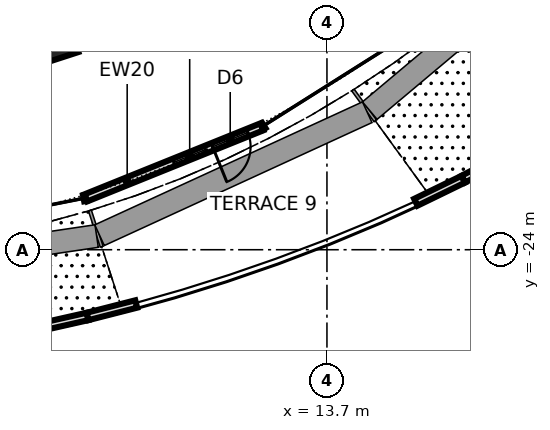
"""IFC4 building model, lengths in metres.
Left out: names, types, materials, properties, quantities, classifications, styles, units other than length and angle.
Written with IfcOpenShell. Run it as: python <this file> out.ifc"""

import sys

from ifc_helpers import new_model, si_unit, direction, frame, frame_2d, origin, origin_2d, place, context, subcontext, project, spatial, rectangle, extrude, element, fill, save


model = new_model("IFC4")
c1 = context("Model", 3, precision=1e-05, world=origin(), true_north=direction((0.0, 1.0)))
c2 = subcontext(c1, "Body", "Model", "MODEL_VIEW")
j1 = project(units=[si_unit("LENGTHUNIT", "METRE"), si_unit("PLANEANGLEUNIT", "RADIAN")], contexts=[c1])
p1 = place(None, origin())
s1 = spatial("IfcSite", under=j1, at=p1, CompositionType="ELEMENT")
p2 = place(p1, origin())
s2 = spatial("IfcBuilding", under=s1, at=p2, CompositionType="ELEMENT")
p3 = place(p2, frame((0.0, 0.0, 19.6)))
s3 = spatial("IfcBuildingStorey", under=s2, at=p3, CompositionType="ELEMENT", Elevation=19.6)
p4 = place(p3, frame((5.9, -18.157, 0.0), z_axis=(0.0, 0.0, 1.0), x_axis=(0.309016994375, -0.951056516295, 0.0)))
e1 = element("IfcColumn", 1, at=p4, inside=s3, PredefinedType="COLUMN", context=c2, shape_type="SweptSolid", body=[
    extrude(rectangle(XDim=2.0, YDim=2.0, at=origin_2d()), origin(), (0.0, 0.0, 1.0), 4.2),
])
p5 = place(p3, frame((7.355, -22.636, 0.0), z_axis=(0.0, 0.0, 1.0), x_axis=(0.92734032011, 0.374219094513, 0.0)))
e2 = element("IfcWall", 2, at=p5, inside=s3, PredefinedType="SOLIDWALL", context=c2, shape_type="SweptSolid", body=[
    extrude(rectangle(XDim=4.997, YDim=0.2, at=frame_2d((2.499, 0.0))), origin(), (0.0, 0.0, 1.0), 4.04),
])
p6 = place(p5, frame((3.597, 0.0, 0.0)))
e3 = element("IfcOpeningElement", 3, at=p6, cuts=e2, PredefinedType="OPENING", context=c2, shape_type="SweptSolid", body=[
    extrude(rectangle(XDim=1.0, YDim=2.4, at=frame_2d((0.5, 1.2))), frame((0.0, 0.11, 0.0), z_axis=(0.0, -1.0, 0.0), x_axis=(1.0, 0.0, 0.0)), (0.0, 0.0, 1.0), 0.22),
])
p7 = place(p5, frame((2.498, 0.0, 0.3)))
e4 = element("IfcOpeningElement", 4, at=p7, cuts=e2, PredefinedType="OPENING", context=c2, shape_type="SweptSolid", body=[
    extrude(rectangle(XDim=0.9, YDim=2.1, at=frame_2d((0.45, 1.05))), frame((0.0, 0.11, 0.0), z_axis=(0.0, -1.0, 0.0), x_axis=(1.0, 0.0, 0.0)), (0.0, 0.0, 1.0), 0.22),
])
p8 = place(p5, frame((3.597, 0.0, 2.7)))
e5 = element("IfcOpeningElement", 5, at=p8, cuts=e2, PredefinedType="OPENING", context=c2, shape_type="SweptSolid", body=[
    extrude(rectangle(XDim=1.0, YDim=0.6, at=frame_2d((0.5, 0.3))), frame((0.0, 0.11, 0.0), z_axis=(0.0, -1.0, 0.0), x_axis=(1.0, 0.0, 0.0)), (0.0, 0.0, 1.0), 0.22),
])
p9 = place(p3, frame((6.119, -26.045, 0.0), z_axis=(0.0, 0.0, 1.0), x_axis=(0.975483423682, 0.220072920009, 0.0)))
e6 = element("IfcWall", 6, at=p9, inside=s3, PredefinedType="PARAPET", context=c2, shape_type="SweptSolid", body=[
    extrude(rectangle(XDim=1.316, YDim=0.2, at=frame_2d((0.658, 0.0))), origin(), (0.0, 0.0, 1.0), 1.1),
])
p10 = place(p3, frame((7.403, -25.755, 0.0), z_axis=(0.0, 0.0, 1.0), x_axis=(0.96883368639, 0.247712107328, 0.0)))
e7 = element("IfcWall", 7, at=p10, inside=s3, PredefinedType="PARAPET", context=c2, shape_type="SweptSolid", body=[
    extrude(rectangle(XDim=1.32, YDim=0.2, at=frame_2d((0.66, 0.0))), origin(), (0.0, 0.0, 1.0), 1.1),
])
p11 = place(p3, frame((16.039, -22.751, 0.0), z_axis=(0.0, 0.0, 1.0), x_axis=(0.899225744736, 0.437484925459, 0.0)))
e8 = element("IfcWall", 8, at=p11, inside=s3, PredefinedType="PARAPET", context=c2, shape_type="SweptSolid", body=[
    extrude(rectangle(XDim=1.389, YDim=0.2, at=frame_2d((0.694, 0.0))), origin(), (0.0, 0.0, 1.0), 1.1),
])
p12 = place(p3, frame((17.288, -22.144, 0.0), z_axis=(0.0, 0.0, 1.0), x_axis=(0.883842797427, 0.467784041451, 0.0)))
e9 = element("IfcWall", 9, at=p12, inside=s3, PredefinedType="PARAPET", context=c2, shape_type="SweptSolid", body=[
    extrude(rectangle(XDim=1.406, YDim=0.2, at=frame_2d((0.703, 0.0))), origin(), (0.0, 0.0, 1.0), 1.1),
])
p13 = place(p6, frame((1.0, 0.0, 0.0), z_axis=(0.0, 0.0, 1.0), x_axis=(-1.0, 0.0, 0.0)))
e10 = element("IfcDoor", 10, at=p13, inside=s3, OperationType="SINGLE_SWING_RIGHT", PredefinedType="DOOR", context=c2, shape_type="SweptSolid", body=[
    extrude(rectangle(XDim=1.0, YDim=2.4, at=frame_2d((0.5, 1.2))), frame((0.0, 0.025, 0.0), z_axis=(0.0, -1.0, 0.0), x_axis=(1.0, 0.0, 0.0)), (0.0, 0.0, 1.0), 0.05),
])
fill(e3, e10)
p14 = place(p7, origin())
e11 = element("IfcWindow", 11, at=p14, inside=s3, PartitioningType="SINGLE_PANEL", PredefinedType="WINDOW", context=c2, shape_type="SweptSolid", body=[
    extrude(rectangle(XDim=0.9, YDim=2.1, at=frame_2d((0.45, 1.05))), frame((0.0, 0.03, 0.0), z_axis=(0.0, -1.0, 0.0), x_axis=(1.0, 0.0, 0.0)), (0.0, 0.0, 1.0), 0.06),
])
fill(e4, e11)
p15 = place(p8, origin())
e12 = element("IfcWindow", 12, at=p15, inside=s3, PartitioningType="SINGLE_PANEL", PredefinedType="WINDOW", context=c2, shape_type="SweptSolid", body=[
    extrude(rectangle(XDim=1.0, YDim=0.6, at=frame_2d((0.5, 0.3))), frame((0.0, 0.03, 0.0), z_axis=(0.0, -1.0, 0.0), x_axis=(1.0, 0.0, 0.0)), (0.0, 0.0, 1.0), 0.06),
])
fill(e5, e12)
save(model, sys.argv[1])
